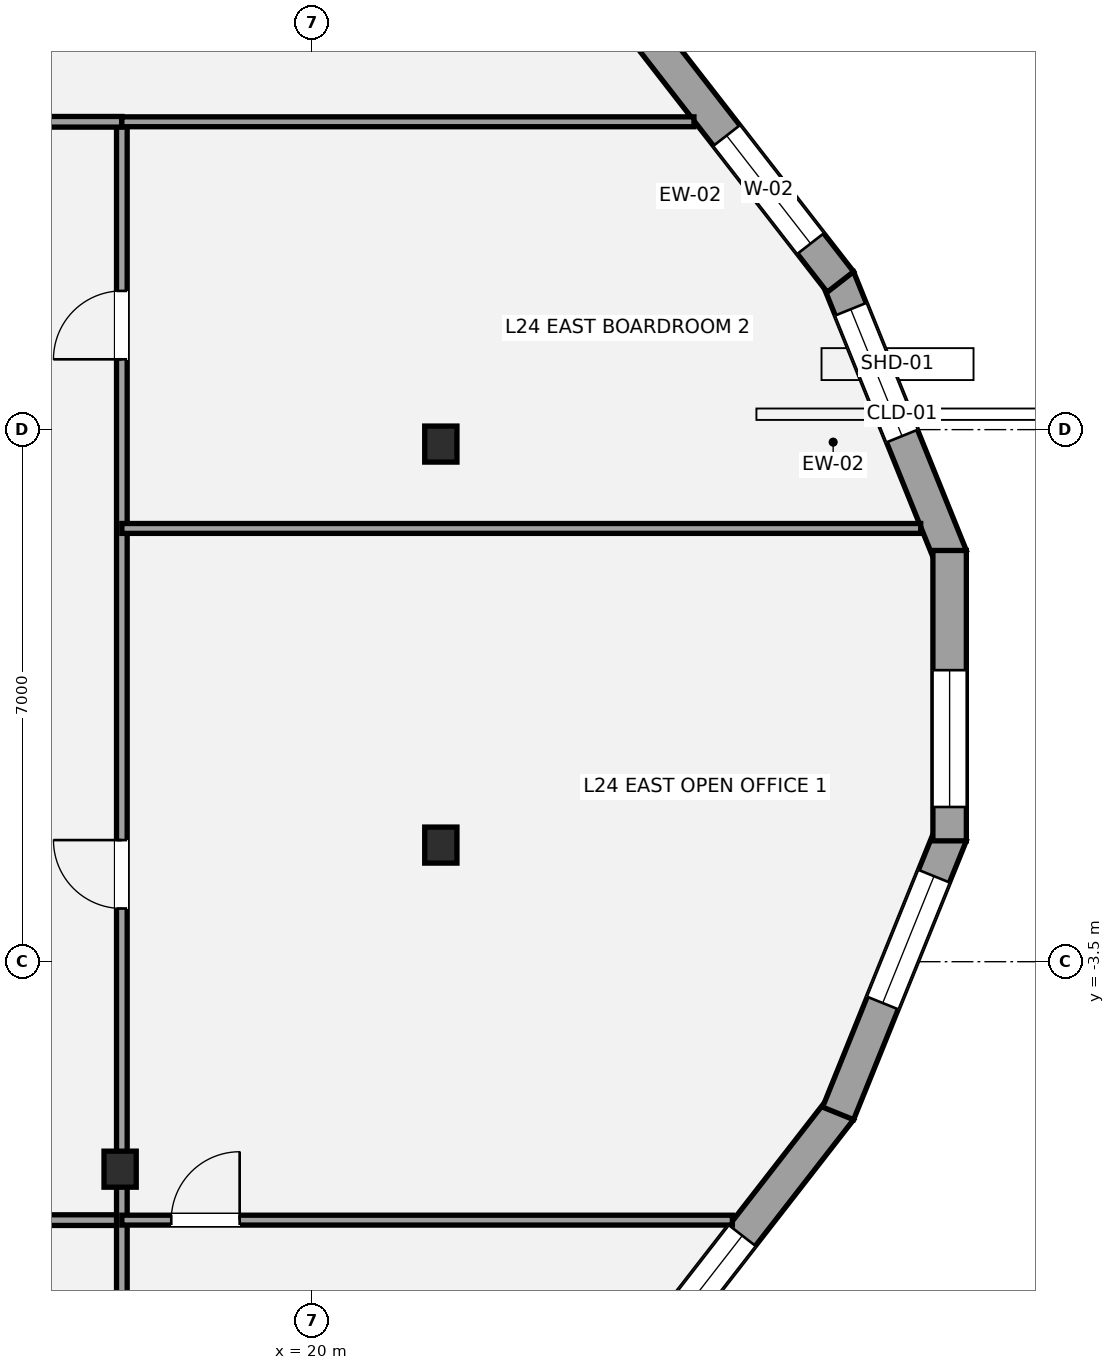
"""IFC4 building model, lengths in metres.
Left out: names, types, materials, properties, quantities, classifications, styles, units other than length and angle.
Written with IfcOpenShell. Run it as: python <this file> out.ifc"""

import sys

from ifc_helpers import new_model, si_unit, direction, frame, frame_2d, origin, origin_2d, place, context, subcontext, project, spatial, rectangle, i_section, extrude, element, fill, save


model = new_model("IFC4")
c1 = context("Model", 3, precision=1e-05, world=origin(), true_north=direction((0.0, 1.0)))
c2 = subcontext(c1, "Body", "Model", "MODEL_VIEW")
j1 = project(units=[si_unit("LENGTHUNIT", "METRE"), si_unit("PLANEANGLEUNIT", "RADIAN")], contexts=[c1])
p1 = place(None, origin())
s1 = spatial("IfcSite", under=j1, at=p1, CompositionType="ELEMENT")
p2 = place(p1, origin())
s2 = spatial("IfcBuilding", under=s1, at=p2, CompositionType="ELEMENT")
p3 = place(p2, frame((0.0, 0.0, 93.1)))
s3 = spatial("IfcBuildingStorey", under=s2, at=p3, CompositionType="ELEMENT", Elevation=93.1)
for number, where, z_axis, x_axis in (
    (1, (21.697, 3.31, 0.0), (0.0, 0.0, 1.0), (1.0, 0.0, 0.0)),
    (2, (17.477, -6.229, 0.0), (0.0, 0.0, 1.0), (1.0, 0.0, 0.0)),
    (3, (21.697, -1.966, 0.0), (0.0, 0.0, 1.0), (1.0, 0.0, 0.0)),
):
    element("IfcColumn", number, at=place(p3, frame(where, z_axis=z_axis, x_axis=x_axis)), inside=s3, PredefinedType="COLUMN", context=c2, shape_type="SweptSolid", body=[
        extrude(i_section(OverallWidth=0.424, OverallDepth=0.474, WebThickness=0.048, FlangeThickness=0.077, at=origin_2d()), origin(), (0.0, 0.0, 1.0), 3.5),
    ])
p4 = place(p3, frame((26.924, 5.496, 0.0), z_axis=(0.0, 0.0, 1.0), x_axis=(0.374920072969, -0.927057138954, 0.0)))
e4 = element("IfcWall", 4, at=p4, inside=s3, PredefinedType="STANDARD", context=c2, shape_type="SweptSolid", body=[
    extrude(rectangle(XDim=3.957, YDim=0.44, at=frame_2d((1.978, 0.0))), origin(), (0.0, 0.0, 1.0), 2.528),
])
p5 = place(p4, frame((0.444, 0.0, 0.65)))
e5 = element("IfcOpeningElement", 5, at=p5, cuts=e4, PredefinedType="OPENING", context=c2, shape_type="SweptSolid", body=[
    extrude(rectangle(XDim=1.8, YDim=1.7, at=frame_2d((0.9, 0.85))), frame((0.0, 0.23, 0.0), z_axis=(0.0, -1.0, 0.0), x_axis=(1.0, 0.0, 0.0)), (0.0, 0.0, 1.0), 0.46),
])
p6 = place(p3, frame((24.376, 8.76, 0.0), z_axis=(0.0, 0.0, 1.0), x_axis=(0.61375552181, -0.789496142769, 0.0)))
e6 = element("IfcWall", 6, at=p6, inside=s3, PredefinedType="STANDARD", context=c2, shape_type="SweptSolid", body=[
    extrude(rectangle(XDim=4.201, YDim=0.44, at=frame_2d((2.101, 0.0))), origin(), (0.0, 0.0, 1.0), 2.528),
])
p7 = place(p6, frame((1.762, 0.0, 0.65)))
e7 = element("IfcOpeningElement", 7, at=p7, cuts=e6, PredefinedType="OPENING", context=c2, shape_type="SweptSolid", body=[
    extrude(rectangle(XDim=1.8, YDim=1.7, at=frame_2d((0.9, 0.85))), frame((0.0, 0.23, 0.0), z_axis=(0.0, -1.0, 0.0), x_axis=(1.0, 0.0, 0.0)), (0.0, 0.0, 1.0), 0.46),
])
p8 = place(p3, frame((26.954, -5.443, 0.0), z_axis=(0.0, 0.0, 1.0), x_axis=(-0.61375552181, -0.789496142769, 0.0)))
e8 = element("IfcWall", 8, at=p8, inside=s3, PredefinedType="STANDARD", context=c2, shape_type="SweptSolid", body=[
    extrude(rectangle(XDim=4.201, YDim=0.44, at=frame_2d((2.101, 0.0))), origin(), (0.0, 0.0, 1.0), 2.528),
])
p9 = place(p8, frame((2.103, 0.0, 0.65)))
e9 = element("IfcOpeningElement", 9, at=p9, cuts=e8, PredefinedType="OPENING", context=c2, shape_type="SweptSolid", body=[
    extrude(rectangle(XDim=1.8, YDim=1.7, at=frame_2d((0.9, 0.85))), frame((0.0, 0.23, 0.0), z_axis=(0.0, -1.0, 0.0), x_axis=(1.0, 0.0, 0.0)), (0.0, 0.0, 1.0), 0.46),
])
p10 = place(p3, frame((28.407, -1.828, 0.0), z_axis=(0.0, 0.0, 1.0), x_axis=(-0.374920072969, -0.927057138954, 0.0)))
e10 = element("IfcWall", 10, at=p10, inside=s3, PredefinedType="STANDARD", context=c2, shape_type="SweptSolid", body=[
    extrude(rectangle(XDim=3.957, YDim=0.44, at=frame_2d((1.978, 0.0))), origin(), (0.0, 0.0, 1.0), 2.528),
])
p11 = place(p10, frame((0.59, 0.0, 0.65)))
e11 = element("IfcOpeningElement", 11, at=p11, cuts=e10, PredefinedType="OPENING", context=c2, shape_type="SweptSolid", body=[
    extrude(rectangle(XDim=1.8, YDim=1.7, at=frame_2d((0.9, 0.85))), frame((0.0, 0.23, 0.0), z_axis=(0.0, -1.0, 0.0), x_axis=(1.0, 0.0, 0.0)), (0.0, 0.0, 1.0), 0.46),
])
p12 = place(p3, frame((28.391, 1.91, 0.0), z_axis=(0.0, 0.0, 1.0), x_axis=(0.0, -1.0, 0.0)))
e12 = element("IfcWall", 12, at=p12, inside=s3, PredefinedType="STANDARD", context=c2, shape_type="SweptSolid", body=[
    extrude(rectangle(XDim=3.82, YDim=0.44, at=frame_2d((1.91, 0.0))), origin(), (0.0, 0.0, 1.0), 2.528),
])
p13 = place(p12, frame((1.575, 0.0, 0.65)))
e13 = element("IfcOpeningElement", 13, at=p13, cuts=e12, PredefinedType="OPENING", context=c2, shape_type="SweptSolid", body=[
    extrude(rectangle(XDim=1.8, YDim=1.7, at=frame_2d((0.9, 0.85))), frame((0.0, 0.23, 0.0), z_axis=(0.0, -1.0, 0.0), x_axis=(1.0, 0.0, 0.0)), (0.0, 0.0, 1.0), 0.46),
])
p14 = place(p3, frame((-15.7, -6.9, 0.0), z_axis=(0.0, 0.0, 1.0), x_axis=(1.0, 0.0, 0.0)))
e14 = element("IfcWall", 14, at=p14, inside=s3, PredefinedType="PARTITIONING", context=c2, shape_type="SweptSolid", body=[
    extrude(rectangle(XDim=33.2, YDim=0.14, at=frame_2d((16.6, 0.0))), origin(), (0.0, 0.0, 1.0), 2.688),
])
p15 = place(p14, frame((3.15, 0.0, 0.0)))
e15 = element("IfcOpeningElement", 15, at=p15, cuts=e14, PredefinedType="OPENING", context=c2, shape_type="SweptSolid", body=[
    extrude(rectangle(XDim=0.9, YDim=2.1, at=frame_2d((0.45, 1.05))), frame((0.0, 0.08, 0.0), z_axis=(0.0, -1.0, 0.0), x_axis=(1.0, 0.0, 0.0)), (0.0, 0.0, 1.0), 0.16),
])
p16 = place(p14, frame((11.0, 0.0, 0.0)))
e16 = element("IfcOpeningElement", 16, at=p16, cuts=e14, PredefinedType="OPENING", context=c2, shape_type="SweptSolid", body=[
    extrude(rectangle(XDim=0.9, YDim=2.1, at=frame_2d((0.45, 1.05))), frame((0.0, 0.08, 0.0), z_axis=(0.0, -1.0, 0.0), x_axis=(1.0, 0.0, 0.0)), (0.0, 0.0, 1.0), 0.16),
])
p17 = place(p14, frame((19.5, 0.0, 0.0)))
e17 = element("IfcOpeningElement", 17, at=p17, cuts=e14, PredefinedType="OPENING", context=c2, shape_type="SweptSolid", body=[
    extrude(rectangle(XDim=0.9, YDim=2.1, at=frame_2d((0.45, 1.05))), frame((0.0, 0.08, 0.0), z_axis=(0.0, -1.0, 0.0), x_axis=(1.0, 0.0, 0.0)), (0.0, 0.0, 1.0), 0.16),
])
p18 = place(p14, frame((27.95, 0.0, 0.0)))
e18 = element("IfcOpeningElement", 18, at=p18, cuts=e14, PredefinedType="OPENING", context=c2, shape_type="SweptSolid", body=[
    extrude(rectangle(XDim=1.5, YDim=2.15, at=frame_2d((0.75, 1.075))), frame((0.0, 0.08, 0.0), z_axis=(0.0, -1.0, 0.0), x_axis=(1.0, 0.0, 0.0)), (0.0, 0.0, 1.0), 0.16),
])
p19 = place(p3, frame((17.5, -13.77, 0.0), z_axis=(0.0, 0.0, 1.0), x_axis=(0.0, 1.0, 0.0)))
e19 = element("IfcWall", 19, at=p19, inside=s3, PredefinedType="PARTITIONING", context=c2, shape_type="SweptSolid", body=[
    extrude(rectangle(XDim=21.32, YDim=0.14, at=frame_2d((10.66, 0.0))), origin(), (0.0, 0.0, 1.0), 2.688),
])
p20 = place(p19, frame((10.969, 0.0, 0.0)))
e20 = element("IfcOpeningElement", 20, at=p20, cuts=e19, PredefinedType="OPENING", context=c2, shape_type="SweptSolid", body=[
    extrude(rectangle(XDim=0.9, YDim=2.1, at=frame_2d((0.45, 1.05))), frame((0.0, 0.08, 0.0), z_axis=(0.0, -1.0, 0.0), x_axis=(1.0, 0.0, 0.0)), (0.0, 0.0, 1.0), 0.16),
])
p21 = place(p19, frame((18.195, 0.0, 0.0)))
e21 = element("IfcOpeningElement", 21, at=p21, cuts=e19, PredefinedType="OPENING", context=c2, shape_type="SweptSolid", body=[
    extrude(rectangle(XDim=0.9, YDim=2.1, at=frame_2d((0.45, 1.05))), frame((0.0, 0.08, 0.0), z_axis=(0.0, -1.0, 0.0), x_axis=(1.0, 0.0, 0.0)), (0.0, 0.0, 1.0), 0.16),
])
p22 = place(p3, frame((13.9, 7.55, 0.0), z_axis=(0.0, 0.0, 1.0), x_axis=(1.0, 0.0, 0.0)))
e22 = element("IfcWall", 22, at=p22, inside=s3, PredefinedType="PARTITIONING", context=c2, shape_type="SweptSolid", body=[
    extrude(rectangle(XDim=3.6, YDim=0.14, at=frame_2d((1.8, 0.0))), origin(), (0.0, 0.0, 1.0), 2.763),
])
p23 = place(p22, frame((0.32, 0.0, 0.0)))
e23 = element("IfcOpeningElement", 23, at=p23, cuts=e22, PredefinedType="OPENING", context=c2, shape_type="SweptSolid", body=[
    extrude(rectangle(XDim=0.92, YDim=2.15, at=frame_2d((0.46, 1.075))), frame((0.0, 0.08, 0.0), z_axis=(0.0, -1.0, 0.0), x_axis=(1.0, 0.0, 0.0)), (0.0, 0.0, 1.0), 0.16),
])
p24 = place(p3, frame((17.5, 7.55, 0.0), z_axis=(0.0, 0.0, 1.0), x_axis=(1.0, 0.0, 0.0)))
e24 = element("IfcWall", 24, at=p24, inside=s3, PredefinedType="PARTITIONING", context=c2, shape_type="SweptSolid", body=[
    extrude(rectangle(XDim=7.527, YDim=0.13, at=frame_2d((3.764, 0.0))), origin(), (0.0, 0.0, 1.0), 3.31),
])
p25 = place(p3, frame((17.5, -6.9, 0.0), z_axis=(0.0, 0.0, 1.0), x_axis=(1.0, 0.0, 0.0)))
e25 = element("IfcWall", 25, at=p25, inside=s3, PredefinedType="PARTITIONING", context=c2, shape_type="SweptSolid", body=[
    extrude(rectangle(XDim=8.033, YDim=0.13, at=frame_2d((4.016, 0.0))), origin(), (0.0, 0.0, 1.0), 3.31),
])
p26 = place(p25, frame((0.65, 0.0, 0.0)))
e26 = element("IfcOpeningElement", 26, at=p26, cuts=e25, PredefinedType="OPENING", context=c2, shape_type="SweptSolid", body=[
    extrude(rectangle(XDim=0.9, YDim=2.1, at=frame_2d((0.45, 1.05))), frame((0.0, 0.075, 0.0), z_axis=(0.0, -1.0, 0.0), x_axis=(1.0, 0.0, 0.0)), (0.0, 0.0, 1.0), 0.15),
])
p27 = place(p3, frame((17.5, 2.2, 0.0), z_axis=(0.0, 0.0, 1.0), x_axis=(1.0, 0.0, 0.0)))
e27 = element("IfcWall", 27, at=p27, inside=s3, PredefinedType="PARTITIONING", context=c2, shape_type="SweptSolid", body=[
    extrude(rectangle(XDim=10.51, YDim=0.13, at=frame_2d((5.255, 0.0))), origin(), (0.0, 0.0, 1.0), 2.751),
])
p28 = place(p5, origin())
e28 = element("IfcWindow", 28, at=p28, inside=s3, PartitioningType="SINGLE_PANEL", PredefinedType="WINDOW", context=c2, shape_type="SweptSolid", body=[
    extrude(rectangle(XDim=1.8, YDim=1.7, at=frame_2d((0.9, 0.85))), frame((0.0, -0.01, 0.0), z_axis=(0.0, -1.0, 0.0), x_axis=(1.0, 0.0, 0.0)), (0.0, 0.0, 1.0), 0.06),
])
fill(e5, e28)
p29 = place(p7, origin())
e29 = element("IfcWindow", 29, at=p29, inside=s3, PartitioningType="SINGLE_PANEL", PredefinedType="WINDOW", context=c2, shape_type="SweptSolid", body=[
    extrude(rectangle(XDim=1.8, YDim=1.7, at=frame_2d((0.9, 0.85))), frame((0.0, -0.01, 0.0), z_axis=(0.0, -1.0, 0.0), x_axis=(1.0, 0.0, 0.0)), (0.0, 0.0, 1.0), 0.06),
])
fill(e7, e29)
p30 = place(p9, origin())
e30 = element("IfcWindow", 30, at=p30, inside=s3, PartitioningType="SINGLE_PANEL", PredefinedType="WINDOW", context=c2, shape_type="SweptSolid", body=[
    extrude(rectangle(XDim=1.8, YDim=1.7, at=frame_2d((0.9, 0.85))), frame((0.0, -0.01, 0.0), z_axis=(0.0, -1.0, 0.0), x_axis=(1.0, 0.0, 0.0)), (0.0, 0.0, 1.0), 0.06),
])
fill(e9, e30)
p31 = place(p11, origin())
e31 = element("IfcWindow", 31, at=p31, inside=s3, PartitioningType="SINGLE_PANEL", PredefinedType="WINDOW", context=c2, shape_type="SweptSolid", body=[
    extrude(rectangle(XDim=1.8, YDim=1.7, at=frame_2d((0.9, 0.85))), frame((0.0, -0.01, 0.0), z_axis=(0.0, -1.0, 0.0), x_axis=(1.0, 0.0, 0.0)), (0.0, 0.0, 1.0), 0.06),
])
fill(e11, e31)
p32 = place(p13, origin())
e32 = element("IfcWindow", 32, at=p32, inside=s3, PartitioningType="SINGLE_PANEL", PredefinedType="WINDOW", context=c2, shape_type="SweptSolid", body=[
    extrude(rectangle(XDim=1.8, YDim=1.7, at=frame_2d((0.9, 0.85))), frame((0.0, -0.01, 0.0), z_axis=(0.0, -1.0, 0.0), x_axis=(1.0, 0.0, 0.0)), (0.0, 0.0, 1.0), 0.06),
])
fill(e13, e32)
p33 = place(p26, origin())
e33 = element("IfcDoor", 33, at=p33, inside=s3, OperationType="SINGLE_SWING_RIGHT", PredefinedType="DOOR", context=c2, shape_type="SweptSolid", body=[
    extrude(rectangle(XDim=0.9, YDim=2.1, at=frame_2d((0.45, 1.05))), frame((0.0, 0.025, 0.0), z_axis=(0.0, -1.0, 0.0), x_axis=(1.0, 0.0, 0.0)), (0.0, 0.0, 1.0), 0.05),
])
fill(e26, e33)
p34 = place(p20, origin())
e34 = element("IfcDoor", 34, at=p34, inside=s3, OperationType="SINGLE_SWING_RIGHT", PredefinedType="DOOR", context=c2, shape_type="SweptSolid", body=[
    extrude(rectangle(XDim=0.9, YDim=2.1, at=frame_2d((0.45, 1.05))), frame((0.0, 0.025, 0.0), z_axis=(0.0, -1.0, 0.0), x_axis=(1.0, 0.0, 0.0)), (0.0, 0.0, 1.0), 0.05),
])
fill(e20, e34)
p35 = place(p21, origin())
e35 = element("IfcDoor", 35, at=p35, inside=s3, OperationType="SINGLE_SWING_LEFT", PredefinedType="DOOR", context=c2, shape_type="SweptSolid", body=[
    extrude(rectangle(XDim=0.9, YDim=2.1, at=frame_2d((0.45, 1.05))), frame((0.0, 0.025, 0.0), z_axis=(0.0, -1.0, 0.0), x_axis=(1.0, 0.0, 0.0)), (0.0, 0.0, 1.0), 0.05),
])
fill(e21, e35)
save(model, sys.argv[1])
